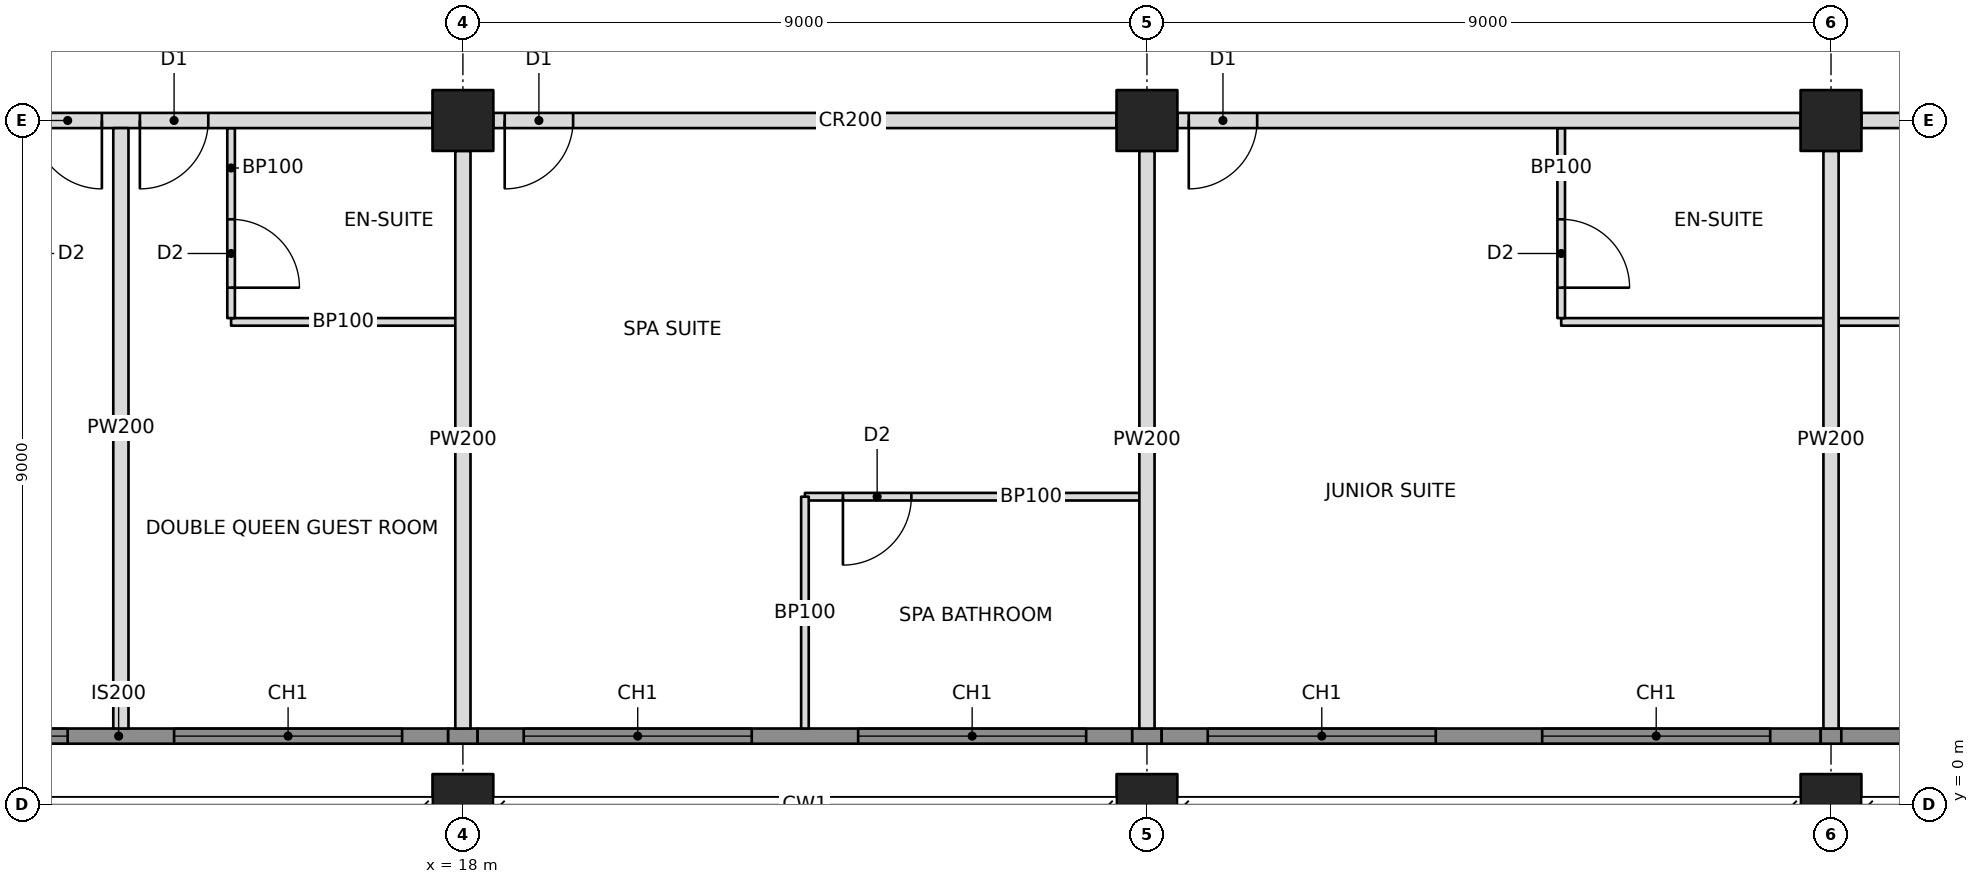
"""IFC4 building model, lengths in metres.
Left out: names, types, materials, properties, quantities, classifications, styles, units other than length and angle.
Written with IfcOpenShell. Run it as: python <this file> out.ifc"""

import sys

from ifc_helpers import new_model, si_unit, direction, frame, frame_2d, origin, origin_2d, place, context, subcontext, project, spatial, rectangle, hollow_rectangle, extrude, element, fill, save


model = new_model("IFC4")
c1 = context("Model", 3, precision=1e-05, world=origin(), true_north=direction((0.0, 1.0)))
c2 = subcontext(c1, "Body", "Model", "MODEL_VIEW")
j1 = project(units=[si_unit("LENGTHUNIT", "METRE"), si_unit("PLANEANGLEUNIT", "RADIAN")], contexts=[c1])
p1 = place(None, origin())
s1 = spatial("IfcSite", under=j1, at=p1, CompositionType="ELEMENT")
p2 = place(p1, origin())
s2 = spatial("IfcBuilding", under=s1, at=p2, CompositionType="ELEMENT")
p3 = place(p2, frame((0.0, 0.0, 184.2)))
s3 = spatial("IfcBuildingStorey", under=s2, at=p3, CompositionType="ELEMENT", Elevation=184.2)
p4 = place(p3, frame((18.0, 0.0, 0.0), z_axis=(0.0, 0.0, 1.0), x_axis=(1.0, 0.0, 0.0)))
e1 = element("IfcColumn", 1, at=p4, inside=s3, PredefinedType="COLUMN", context=c2, shape_type="SweptSolid", body=[
    extrude(hollow_rectangle(XDim=0.8, YDim=0.8, WallThickness=0.07, at=origin_2d()), origin(), (0.0, 0.0, 1.0), 3.4),
])
p5 = place(p3, frame((18.0, 9.0, 0.0), z_axis=(0.0, 0.0, 1.0), x_axis=(1.0, 0.0, 0.0)))
e2 = element("IfcColumn", 2, at=p5, inside=s3, PredefinedType="COLUMN", context=c2, shape_type="SweptSolid", body=[
    extrude(hollow_rectangle(XDim=0.8, YDim=0.8, WallThickness=0.06, at=origin_2d()), origin(), (0.0, 0.0, 1.0), 3.4),
])
p6 = place(p3, frame((27.0, 0.0, 0.0), z_axis=(0.0, 0.0, 1.0), x_axis=(1.0, 0.0, 0.0)))
e3 = element("IfcColumn", 3, at=p6, inside=s3, PredefinedType="COLUMN", context=c2, shape_type="SweptSolid", body=[
    extrude(hollow_rectangle(XDim=0.8, YDim=0.8, WallThickness=0.07, at=origin_2d()), origin(), (0.0, 0.0, 1.0), 3.4),
])
p7 = place(p3, frame((27.0, 9.0, 0.0), z_axis=(0.0, 0.0, 1.0), x_axis=(1.0, 0.0, 0.0)))
e4 = element("IfcColumn", 4, at=p7, inside=s3, PredefinedType="COLUMN", context=c2, shape_type="SweptSolid", body=[
    extrude(hollow_rectangle(XDim=0.8, YDim=0.8, WallThickness=0.06, at=origin_2d()), origin(), (0.0, 0.0, 1.0), 3.4),
])
p8 = place(p3, frame((36.0, 0.0, 0.0), z_axis=(0.0, 0.0, 1.0), x_axis=(1.0, 0.0, 0.0)))
e5 = element("IfcColumn", 5, at=p8, inside=s3, PredefinedType="COLUMN", context=c2, shape_type="SweptSolid", body=[
    extrude(hollow_rectangle(XDim=0.8, YDim=0.8, WallThickness=0.07, at=origin_2d()), origin(), (0.0, 0.0, 1.0), 3.4),
])
p9 = place(p3, frame((36.0, 9.0, 0.0), z_axis=(0.0, 0.0, 1.0), x_axis=(0.0, 1.0, 0.0)))
e6 = element("IfcColumn", 6, at=p9, inside=s3, PredefinedType="COLUMN", context=c2, shape_type="SweptSolid", body=[
    extrude(hollow_rectangle(XDim=0.8, YDim=0.8, WallThickness=0.06, at=origin_2d()), origin(), (0.0, 0.0, 1.0), 3.4),
])
p10 = place(p3, frame((9.4, 9.0, 0.0), z_axis=(0.0, 0.0, 1.0), x_axis=(1.0, 0.0, 0.0)))
e7 = element("IfcWall", 7, at=p10, inside=s3, PredefinedType="PARTITIONING", context=c2, shape_type="SweptSolid", body=[
    extrude(rectangle(XDim=8.2, YDim=0.2, at=frame_2d((4.1, 0.0))), origin(), (0.0, 0.0, 1.0), 2.405),
])
p11 = place(p10, frame((2.95, 0.0, 0.0)))
e8 = element("IfcOpeningElement", 8, at=p11, cuts=e7, PredefinedType="OPENING", context=c2, shape_type="SweptSolid", body=[
    extrude(rectangle(XDim=0.9, YDim=2.1, at=frame_2d((0.45, 1.05))), frame((0.0, 0.11, 0.0), z_axis=(0.0, -1.0, 0.0), x_axis=(1.0, 0.0, 0.0)), (0.0, 0.0, 1.0), 0.22),
])
p12 = place(p10, frame((4.35, 0.0, 0.0)))
e9 = element("IfcOpeningElement", 9, at=p12, cuts=e7, PredefinedType="OPENING", context=c2, shape_type="SweptSolid", body=[
    extrude(rectangle(XDim=0.9, YDim=2.1, at=frame_2d((0.45, 1.05))), frame((0.0, 0.11, 0.0), z_axis=(0.0, -1.0, 0.0), x_axis=(1.0, 0.0, 0.0)), (0.0, 0.0, 1.0), 0.22),
])
p13 = place(p3, frame((18.4, 9.0, 0.0), z_axis=(0.0, 0.0, 1.0), x_axis=(1.0, 0.0, 0.0)))
e10 = element("IfcWall", 10, at=p13, inside=s3, PredefinedType="PARTITIONING", context=c2, shape_type="SweptSolid", body=[
    extrude(rectangle(XDim=8.2, YDim=0.2, at=frame_2d((4.1, 0.0))), origin(), (0.0, 0.0, 1.0), 2.405),
])
p14 = place(p13, frame((0.15, 0.0, 0.0)))
e11 = element("IfcOpeningElement", 11, at=p14, cuts=e10, PredefinedType="OPENING", context=c2, shape_type="SweptSolid", body=[
    extrude(rectangle(XDim=0.9, YDim=2.1, at=frame_2d((0.45, 1.05))), frame((0.0, 0.11, 0.0), z_axis=(0.0, -1.0, 0.0), x_axis=(1.0, 0.0, 0.0)), (0.0, 0.0, 1.0), 0.22),
])
p15 = place(p3, frame((27.4, 9.0, 0.0), z_axis=(0.0, 0.0, 1.0), x_axis=(1.0, 0.0, 0.0)))
e12 = element("IfcWall", 12, at=p15, inside=s3, PredefinedType="PARTITIONING", context=c2, shape_type="SweptSolid", body=[
    extrude(rectangle(XDim=8.2, YDim=0.2, at=frame_2d((4.1, 0.0))), origin(), (0.0, 0.0, 1.0), 2.405),
])
p16 = place(p15, frame((0.15, 0.0, 0.0)))
e13 = element("IfcOpeningElement", 13, at=p16, cuts=e12, PredefinedType="OPENING", context=c2, shape_type="SweptSolid", body=[
    extrude(rectangle(XDim=0.9, YDim=2.1, at=frame_2d((0.45, 1.05))), frame((0.0, 0.11, 0.0), z_axis=(0.0, -1.0, 0.0), x_axis=(1.0, 0.0, 0.0)), (0.0, 0.0, 1.0), 0.22),
])
p17 = place(p3, frame((36.4, 9.0, 0.0), z_axis=(0.0, 0.0, 1.0), x_axis=(1.0, 0.0, 0.0)))
e14 = element("IfcWall", 14, at=p17, inside=s3, PredefinedType="PARTITIONING", context=c2, shape_type="SweptSolid", body=[
    extrude(rectangle(XDim=7.6, YDim=0.2, at=frame_2d((3.8, 0.0))), origin(), (0.0, 0.0, 1.0), 2.438),
])
p18 = place(p17, frame((6.45, 0.0, 0.0)))
e15 = element("IfcOpeningElement", 15, at=p18, cuts=e14, PredefinedType="OPENING", context=c2, shape_type="SweptSolid", body=[
    extrude(rectangle(XDim=0.9, YDim=2.1, at=frame_2d((0.45, 1.05))), frame((0.0, 0.11, 0.0), z_axis=(0.0, -1.0, 0.0), x_axis=(1.0, 0.0, 0.0)), (0.0, 0.0, 1.0), 0.22),
])
p19 = place(p3, frame((13.5, 8.9, 0.0), z_axis=(0.0, 0.0, 1.0), x_axis=(0.0, -1.0, 0.0)))
e16 = element("IfcWall", 16, at=p19, inside=s3, PredefinedType="PARTITIONING", context=c2, shape_type="SweptSolid", body=[
    extrude(rectangle(XDim=7.9, YDim=0.2, at=frame_2d((3.95, 0.0))), origin(), (0.0, 0.0, 1.0), 2.404),
])
for number, where, z_axis, x_axis in (
    (17, (18.0, 8.6, 0.0), (0.0, 0.0, 1.0), (0.0, -1.0, 0.0)),
    (18, (27.0, 8.6, 0.0), (0.0, 0.0, 1.0), (0.0, -1.0, 0.0)),
):
    element("IfcWall", number, at=place(p3, frame(where, z_axis=z_axis, x_axis=x_axis)), inside=s3, PredefinedType="PARTITIONING", context=c2, shape_type="SweptSolid", body=[
        extrude(rectangle(XDim=7.6, YDim=0.2, at=frame_2d((3.8, 0.0))), origin(), (0.0, 0.0, 1.0), 2.405),
    ])
p20 = place(p3, frame((36.0, 8.6, 0.0), z_axis=(0.0, 0.0, 1.0), x_axis=(0.0, -1.0, 0.0)))
e19 = element("IfcWall", 19, at=p20, inside=s3, PredefinedType="PARTITIONING", context=c2, shape_type="SweptSolid", body=[
    extrude(rectangle(XDim=7.6, YDim=0.2, at=frame_2d((3.8, 0.0))), origin(), (0.0, 0.0, 1.0), 2.438),
])
p21 = place(p3, frame((14.95, 6.35, 0.0), z_axis=(0.0, 0.0, 1.0), x_axis=(1.0, 0.0, 0.0)))
e20 = element("IfcWall", 20, at=p21, inside=s3, PredefinedType="PARTITIONING", context=c2, shape_type="SweptSolid", body=[
    extrude(rectangle(XDim=2.95, YDim=0.1, at=frame_2d((1.475, 0.0))), origin(), (0.0, 0.0, 1.0), 2.404),
])
p22 = place(p3, frame((14.95, 8.9, 0.0), z_axis=(0.0, 0.0, 1.0), x_axis=(0.0, -1.0, 0.0)))
e21 = element("IfcWall", 21, at=p22, inside=s3, PredefinedType="PARTITIONING", context=c2, shape_type="SweptSolid", body=[
    extrude(rectangle(XDim=2.5, YDim=0.1, at=frame_2d((1.25, 0.0))), origin(), (0.0, 0.0, 1.0), 2.404),
])
p23 = place(p22, frame((1.2, 0.0, 0.0)))
e22 = element("IfcOpeningElement", 22, at=p23, cuts=e21, PredefinedType="OPENING", context=c2, shape_type="SweptSolid", body=[
    extrude(rectangle(XDim=0.9, YDim=2.1, at=frame_2d((0.45, 1.05))), frame((0.0, 0.06, 0.0), z_axis=(0.0, -1.0, 0.0), x_axis=(1.0, 0.0, 0.0)), (0.0, 0.0, 1.0), 0.12),
])
p24 = place(p3, frame((22.5, 4.05, 0.0), z_axis=(0.0, 0.0, 1.0), x_axis=(1.0, 0.0, 0.0)))
e23 = element("IfcWall", 23, at=p24, inside=s3, PredefinedType="PARTITIONING", context=c2, shape_type="SweptSolid", body=[
    extrude(rectangle(XDim=4.4, YDim=0.1, at=frame_2d((2.2, 0.0))), origin(), (0.0, 0.0, 1.0), 2.404),
])
p25 = place(p24, frame((0.5, 0.0, 0.0)))
e24 = element("IfcOpeningElement", 24, at=p25, cuts=e23, PredefinedType="OPENING", context=c2, shape_type="SweptSolid", body=[
    extrude(rectangle(XDim=0.9, YDim=2.1, at=frame_2d((0.45, 1.05))), frame((0.0, 0.06, 0.0), z_axis=(0.0, -1.0, 0.0), x_axis=(1.0, 0.0, 0.0)), (0.0, 0.0, 1.0), 0.12),
])
p26 = place(p3, frame((22.5, 4.05, 0.0), z_axis=(0.0, 0.0, 1.0), x_axis=(0.0, -1.0, 0.0)))
e25 = element("IfcWall", 25, at=p26, inside=s3, PredefinedType="PARTITIONING", context=c2, shape_type="SweptSolid", body=[
    extrude(rectangle(XDim=3.05, YDim=0.1, at=frame_2d((1.525, 0.0))), origin(), (0.0, 0.0, 1.0), 3.2),
])
p27 = place(p3, frame((32.45, 6.35, 0.0), z_axis=(0.0, 0.0, 1.0), x_axis=(1.0, 0.0, 0.0)))
e26 = element("IfcWall", 26, at=p27, inside=s3, PredefinedType="PARTITIONING", context=c2, shape_type="SweptSolid", body=[
    extrude(rectangle(XDim=3.45, YDim=0.1, at=frame_2d((1.725, 0.0))), origin(), (0.0, 0.0, 1.0), 2.438),
])
p28 = place(p3, frame((32.45, 8.9, 0.0), z_axis=(0.0, 0.0, 1.0), x_axis=(0.0, -1.0, 0.0)))
e27 = element("IfcWall", 27, at=p28, inside=s3, PredefinedType="PARTITIONING", context=c2, shape_type="SweptSolid", body=[
    extrude(rectangle(XDim=2.5, YDim=0.1, at=frame_2d((1.25, 0.0))), origin(), (0.0, 0.0, 1.0), 2.404),
])
p29 = place(p28, frame((1.2, 0.0, 0.0)))
e28 = element("IfcOpeningElement", 28, at=p29, cuts=e27, PredefinedType="OPENING", context=c2, shape_type="SweptSolid", body=[
    extrude(rectangle(XDim=0.9, YDim=2.1, at=frame_2d((0.45, 1.05))), frame((0.0, 0.06, 0.0), z_axis=(0.0, -1.0, 0.0), x_axis=(1.0, 0.0, 0.0)), (0.0, 0.0, 1.0), 0.12),
])
p30 = place(p3, frame((36.1, 6.35, 0.0), z_axis=(0.0, 0.0, 1.0), x_axis=(1.0, 0.0, 0.0)))
e29 = element("IfcWall", 29, at=p30, inside=s3, PredefinedType="PARTITIONING", context=c2, shape_type="SweptSolid", body=[
    extrude(rectangle(XDim=3.45, YDim=0.1, at=frame_2d((1.725, 0.0))), origin(), (0.0, 0.0, 1.0), 2.438),
])
p31 = place(p3, frame((9.135, 0.9, 0.0), z_axis=(0.0, 0.0, 1.0), x_axis=(1.0, 0.0, 0.0)))
e30 = element("IfcWall", 30, at=p31, inside=s3, PredefinedType="SOLIDWALL", context=c2, shape_type="SweptSolid", body=[
    extrude(rectangle(XDim=8.671, YDim=0.2, at=frame_2d((4.335, 0.0))), origin(), (0.0, 0.0, 1.0), 3.2),
])
p32 = place(p31, frame((0.665, 0.0, 0.6)))
e31 = element("IfcOpeningElement", 31, at=p32, cuts=e30, PredefinedType="OPENING", context=c2, shape_type="SweptSolid", body=[
    extrude(rectangle(XDim=3.0, YDim=2.2, at=frame_2d((1.5, 1.1))), frame((0.0, 0.11, 0.0), z_axis=(0.0, -1.0, 0.0), x_axis=(1.0, 0.0, 0.0)), (0.0, 0.0, 1.0), 0.22),
])
p33 = place(p31, frame((5.065, 0.0, 0.6)))
e32 = element("IfcOpeningElement", 32, at=p33, cuts=e30, PredefinedType="OPENING", context=c2, shape_type="SweptSolid", body=[
    extrude(rectangle(XDim=3.0, YDim=2.2, at=frame_2d((1.5, 1.1))), frame((0.0, 0.11, 0.0), z_axis=(0.0, -1.0, 0.0), x_axis=(1.0, 0.0, 0.0)), (0.0, 0.0, 1.0), 0.22),
])
p34 = place(p3, frame((17.806, 0.9, 0.0), z_axis=(0.0, 0.0, 1.0), x_axis=(1.0, 0.0, 0.0)))
e33 = element("IfcWall", 33, at=p34, inside=s3, PredefinedType="SOLIDWALL", context=c2, shape_type="SweptSolid", body=[
    extrude(rectangle(XDim=0.388, YDim=0.2, at=frame_2d((0.194, 0.0))), origin(), (0.0, 0.0, 1.0), 2.404),
])
p35 = place(p3, frame((18.194, 0.9, 0.0), z_axis=(0.0, 0.0, 1.0), x_axis=(1.0, 0.0, 0.0)))
e34 = element("IfcWall", 34, at=p35, inside=s3, PredefinedType="SOLIDWALL", context=c2, shape_type="SweptSolid", body=[
    extrude(rectangle(XDim=8.612, YDim=0.2, at=frame_2d((4.306, 0.0))), origin(), (0.0, 0.0, 1.0), 3.2),
])
p36 = place(p35, frame((0.606, 0.0, 0.6)))
e35 = element("IfcOpeningElement", 35, at=p36, cuts=e34, PredefinedType="OPENING", context=c2, shape_type="SweptSolid", body=[
    extrude(rectangle(XDim=3.0, YDim=2.2, at=frame_2d((1.5, 1.1))), frame((0.0, 0.11, 0.0), z_axis=(0.0, -1.0, 0.0), x_axis=(1.0, 0.0, 0.0)), (0.0, 0.0, 1.0), 0.22),
])
p37 = place(p35, frame((5.006, 0.0, 0.6)))
e36 = element("IfcOpeningElement", 36, at=p37, cuts=e34, PredefinedType="OPENING", context=c2, shape_type="SweptSolid", body=[
    extrude(rectangle(XDim=3.0, YDim=2.2, at=frame_2d((1.5, 1.1))), frame((0.0, 0.11, 0.0), z_axis=(0.0, -1.0, 0.0), x_axis=(1.0, 0.0, 0.0)), (0.0, 0.0, 1.0), 0.22),
])
p38 = place(p3, frame((26.806, 0.9, 0.0), z_axis=(0.0, 0.0, 1.0), x_axis=(1.0, 0.0, 0.0)))
e37 = element("IfcWall", 37, at=p38, inside=s3, PredefinedType="SOLIDWALL", context=c2, shape_type="SweptSolid", body=[
    extrude(rectangle(XDim=0.388, YDim=0.2, at=frame_2d((0.194, 0.0))), origin(), (0.0, 0.0, 1.0), 2.404),
])
p39 = place(p3, frame((27.194, 0.9, 0.0), z_axis=(0.0, 0.0, 1.0), x_axis=(1.0, 0.0, 0.0)))
e38 = element("IfcWall", 38, at=p39, inside=s3, PredefinedType="SOLIDWALL", context=c2, shape_type="SweptSolid", body=[
    extrude(rectangle(XDim=8.671, YDim=0.2, at=frame_2d((4.335, 0.0))), origin(), (0.0, 0.0, 1.0), 3.2),
])
p40 = place(p39, frame((0.606, 0.0, 0.6)))
e39 = element("IfcOpeningElement", 39, at=p40, cuts=e38, PredefinedType="OPENING", context=c2, shape_type="SweptSolid", body=[
    extrude(rectangle(XDim=3.0, YDim=2.2, at=frame_2d((1.5, 1.1))), frame((0.0, 0.11, 0.0), z_axis=(0.0, -1.0, 0.0), x_axis=(1.0, 0.0, 0.0)), (0.0, 0.0, 1.0), 0.22),
])
p41 = place(p39, frame((5.006, 0.0, 0.6)))
e40 = element("IfcOpeningElement", 40, at=p41, cuts=e38, PredefinedType="OPENING", context=c2, shape_type="SweptSolid", body=[
    extrude(rectangle(XDim=3.0, YDim=2.2, at=frame_2d((1.5, 1.1))), frame((0.0, 0.11, 0.0), z_axis=(0.0, -1.0, 0.0), x_axis=(1.0, 0.0, 0.0)), (0.0, 0.0, 1.0), 0.22),
])
p42 = place(p3, frame((35.865, 0.9, 0.0), z_axis=(0.0, 0.0, 1.0), x_axis=(1.0, 0.0, 0.0)))
e41 = element("IfcWall", 41, at=p42, inside=s3, PredefinedType="SOLIDWALL", context=c2, shape_type="SweptSolid", body=[
    extrude(rectangle(XDim=0.271, YDim=0.2, at=frame_2d((0.135, 0.0))), origin(), (0.0, 0.0, 1.0), 2.438),
])
p43 = place(p3, frame((36.135, 0.9, 0.0), z_axis=(0.0, 0.0, 1.0), x_axis=(1.0, 0.0, 0.0)))
e42 = element("IfcWall", 42, at=p43, inside=s3, PredefinedType="SOLIDWALL", context=c2, shape_type="SweptSolid", body=[
    extrude(rectangle(XDim=5.865, YDim=0.2, at=frame_2d((2.932, 0.0))), origin(), (0.0, 0.0, 1.0), 3.2),
])
p44 = place(p43, frame((1.415, 0.0, 0.6)))
e43 = element("IfcOpeningElement", 43, at=p44, cuts=e42, PredefinedType="OPENING", context=c2, shape_type="SweptSolid", body=[
    extrude(rectangle(XDim=3.0, YDim=2.2, at=frame_2d((1.5, 1.1))), frame((0.0, 0.11, 0.0), z_axis=(0.0, -1.0, 0.0), x_axis=(1.0, 0.0, 0.0)), (0.0, 0.0, 1.0), 0.22),
])
p45 = place(p32, origin())
e44 = element("IfcWindow", 44, at=p45, inside=s3, PartitioningType="TRIPLE_PANEL_VERTICAL", PredefinedType="WINDOW", context=c2, shape_type="SweptSolid", body=[
    extrude(rectangle(XDim=3.0, YDim=2.2, at=frame_2d((1.5, 1.1))), frame((0.0, 0.03, 0.0), z_axis=(0.0, -1.0, 0.0), x_axis=(1.0, 0.0, 0.0)), (0.0, 0.0, 1.0), 0.06),
])
fill(e31, e44)
p46 = place(p33, origin())
e45 = element("IfcWindow", 45, at=p46, inside=s3, PartitioningType="TRIPLE_PANEL_VERTICAL", PredefinedType="WINDOW", context=c2, shape_type="SweptSolid", body=[
    extrude(rectangle(XDim=3.0, YDim=2.2, at=frame_2d((1.5, 1.1))), frame((0.0, 0.03, 0.0), z_axis=(0.0, -1.0, 0.0), x_axis=(1.0, 0.0, 0.0)), (0.0, 0.0, 1.0), 0.06),
])
fill(e32, e45)
p47 = place(p36, origin())
e46 = element("IfcWindow", 46, at=p47, inside=s3, PartitioningType="TRIPLE_PANEL_VERTICAL", PredefinedType="WINDOW", context=c2, shape_type="SweptSolid", body=[
    extrude(rectangle(XDim=3.0, YDim=2.2, at=frame_2d((1.5, 1.1))), frame((0.0, 0.03, 0.0), z_axis=(0.0, -1.0, 0.0), x_axis=(1.0, 0.0, 0.0)), (0.0, 0.0, 1.0), 0.06),
])
fill(e35, e46)
p48 = place(p37, origin())
e47 = element("IfcWindow", 47, at=p48, inside=s3, PartitioningType="TRIPLE_PANEL_VERTICAL", PredefinedType="WINDOW", context=c2, shape_type="SweptSolid", body=[
    extrude(rectangle(XDim=3.0, YDim=2.2, at=frame_2d((1.5, 1.1))), frame((0.0, 0.03, 0.0), z_axis=(0.0, -1.0, 0.0), x_axis=(1.0, 0.0, 0.0)), (0.0, 0.0, 1.0), 0.06),
])
fill(e36, e47)
p49 = place(p40, origin())
e48 = element("IfcWindow", 48, at=p49, inside=s3, PartitioningType="TRIPLE_PANEL_VERTICAL", PredefinedType="WINDOW", context=c2, shape_type="SweptSolid", body=[
    extrude(rectangle(XDim=3.0, YDim=2.2, at=frame_2d((1.5, 1.1))), frame((0.0, 0.03, 0.0), z_axis=(0.0, -1.0, 0.0), x_axis=(1.0, 0.0, 0.0)), (0.0, 0.0, 1.0), 0.06),
])
fill(e39, e48)
p50 = place(p41, origin())
e49 = element("IfcWindow", 49, at=p50, inside=s3, PartitioningType="TRIPLE_PANEL_VERTICAL", PredefinedType="WINDOW", context=c2, shape_type="SweptSolid", body=[
    extrude(rectangle(XDim=3.0, YDim=2.2, at=frame_2d((1.5, 1.1))), frame((0.0, 0.03, 0.0), z_axis=(0.0, -1.0, 0.0), x_axis=(1.0, 0.0, 0.0)), (0.0, 0.0, 1.0), 0.06),
])
fill(e40, e49)
p51 = place(p11, frame((0.9, 0.0, 0.0), z_axis=(0.0, 0.0, 1.0), x_axis=(-1.0, 0.0, 0.0)))
e50 = element("IfcDoor", 50, at=p51, inside=s3, OperationType="SINGLE_SWING_LEFT", PredefinedType="DOOR", context=c2, shape_type="SweptSolid", body=[
    extrude(rectangle(XDim=0.9, YDim=2.1, at=frame_2d((0.45, 1.05))), frame((0.0, 0.025, 0.0), z_axis=(0.0, -1.0, 0.0), x_axis=(1.0, 0.0, 0.0)), (0.0, 0.0, 1.0), 0.05),
])
fill(e8, e50)
p52 = place(p23, origin())
e51 = element("IfcDoor", 51, at=p52, inside=s3, OperationType="SINGLE_SWING_RIGHT", PredefinedType="DOOR", context=c2, shape_type="SweptSolid", body=[
    extrude(rectangle(XDim=0.9, YDim=2.1, at=frame_2d((0.45, 1.05))), frame((0.0, 0.025, 0.0), z_axis=(0.0, -1.0, 0.0), x_axis=(1.0, 0.0, 0.0)), (0.0, 0.0, 1.0), 0.05),
])
fill(e22, e51)
p53 = place(p12, frame((0.9, 0.0, 0.0), z_axis=(0.0, 0.0, 1.0), x_axis=(-1.0, 0.0, 0.0)))
e52 = element("IfcDoor", 52, at=p53, inside=s3, OperationType="SINGLE_SWING_RIGHT", PredefinedType="DOOR", context=c2, shape_type="SweptSolid", body=[
    extrude(rectangle(XDim=0.9, YDim=2.1, at=frame_2d((0.45, 1.05))), frame((0.0, 0.025, 0.0), z_axis=(0.0, -1.0, 0.0), x_axis=(1.0, 0.0, 0.0)), (0.0, 0.0, 1.0), 0.05),
])
fill(e9, e52)
p54 = place(p25, frame((0.9, 0.0, 0.0), z_axis=(0.0, 0.0, 1.0), x_axis=(-1.0, 0.0, 0.0)))
e53 = element("IfcDoor", 53, at=p54, inside=s3, OperationType="SINGLE_SWING_RIGHT", PredefinedType="DOOR", context=c2, shape_type="SweptSolid", body=[
    extrude(rectangle(XDim=0.9, YDim=2.1, at=frame_2d((0.45, 1.05))), frame((0.0, 0.025, 0.0), z_axis=(0.0, -1.0, 0.0), x_axis=(1.0, 0.0, 0.0)), (0.0, 0.0, 1.0), 0.05),
])
fill(e24, e53)
p55 = place(p14, frame((0.9, 0.0, 0.0), z_axis=(0.0, 0.0, 1.0), x_axis=(-1.0, 0.0, 0.0)))
e54 = element("IfcDoor", 54, at=p55, inside=s3, OperationType="SINGLE_SWING_RIGHT", PredefinedType="DOOR", context=c2, shape_type="SweptSolid", body=[
    extrude(rectangle(XDim=0.9, YDim=2.1, at=frame_2d((0.45, 1.05))), frame((0.0, 0.025, 0.0), z_axis=(0.0, -1.0, 0.0), x_axis=(1.0, 0.0, 0.0)), (0.0, 0.0, 1.0), 0.05),
])
fill(e11, e54)
p56 = place(p29, origin())
e55 = element("IfcDoor", 55, at=p56, inside=s3, OperationType="SINGLE_SWING_RIGHT", PredefinedType="DOOR", context=c2, shape_type="SweptSolid", body=[
    extrude(rectangle(XDim=0.9, YDim=2.1, at=frame_2d((0.45, 1.05))), frame((0.0, 0.025, 0.0), z_axis=(0.0, -1.0, 0.0), x_axis=(1.0, 0.0, 0.0)), (0.0, 0.0, 1.0), 0.05),
])
fill(e28, e55)
p57 = place(p16, frame((0.9, 0.0, 0.0), z_axis=(0.0, 0.0, 1.0), x_axis=(-1.0, 0.0, 0.0)))
e56 = element("IfcDoor", 56, at=p57, inside=s3, OperationType="SINGLE_SWING_RIGHT", PredefinedType="DOOR", context=c2, shape_type="SweptSolid", body=[
    extrude(rectangle(XDim=0.9, YDim=2.1, at=frame_2d((0.45, 1.05))), frame((0.0, 0.025, 0.0), z_axis=(0.0, -1.0, 0.0), x_axis=(1.0, 0.0, 0.0)), (0.0, 0.0, 1.0), 0.05),
])
fill(e13, e56)
save(model, sys.argv[1])
